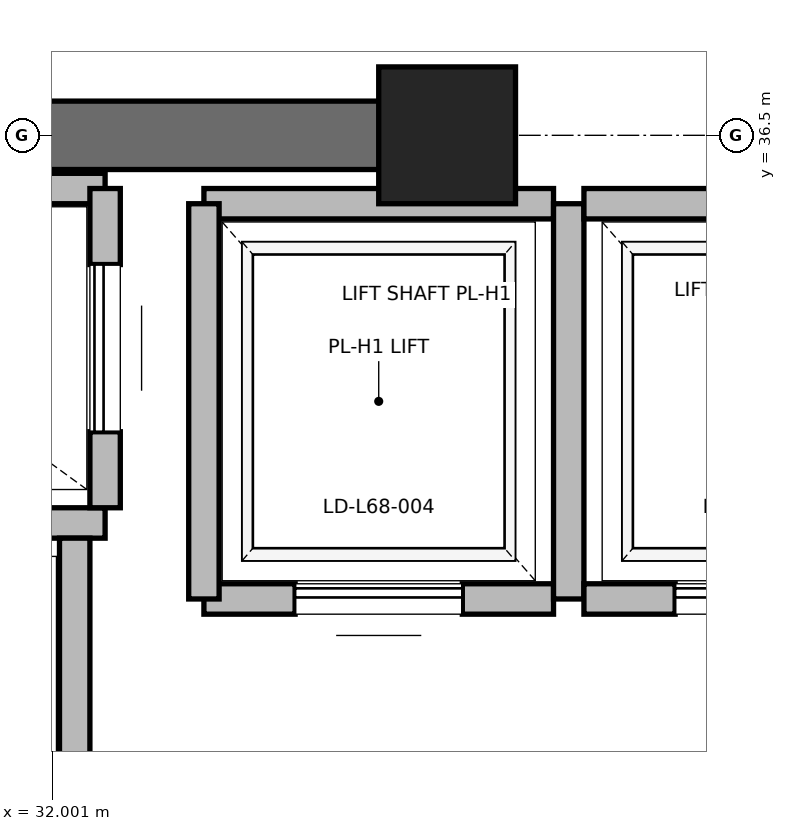
"""IFC4 building model, lengths in metres.
Left out: names, types, materials, properties, quantities, classifications, styles, units other than length and angle.
Written with IfcOpenShell. Run it as: python <this file> out.ifc"""

import sys

from ifc_helpers import new_model, si_unit, direction, frame, frame_2d, origin, origin_2d, place, context, subcontext, project, spatial, rectangle, extrude, element, fill, save


model = new_model("IFC4")
c1 = context("Model", 3, precision=1e-05, world=origin(), true_north=direction((0.0, 1.0)))
c2 = subcontext(c1, "Body", "Model", "MODEL_VIEW")
j1 = project(units=[si_unit("LENGTHUNIT", "METRE"), si_unit("PLANEANGLEUNIT", "RADIAN")], contexts=[c1])
p1 = place(None, origin())
s1 = spatial("IfcSite", under=j1, at=p1, CompositionType="ELEMENT")
p2 = place(p1, origin())
s2 = spatial("IfcBuilding", under=s1, at=p2, CompositionType="ELEMENT")
p3 = place(p2, frame((0.0, 0.0, 291.2)))
s3 = spatial("IfcBuildingStorey", under=s2, at=p3, CompositionType="ELEMENT", Elevation=291.2)
p4 = place(p3, frame((34.6, 36.5, 0.0), z_axis=(0.0, 0.0, 1.0), x_axis=(1.0, 0.0, 0.0)))
e1 = element("IfcColumn", 1, at=p4, inside=s3, PredefinedType="PILASTER", context=c2, shape_type="SweptSolid", body=[
    extrude(rectangle(XDim=0.9, YDim=0.9, at=origin_2d()), origin(), (0.0, 0.0, 1.0), 4.0),
])
p5 = place(p3, frame((29.0, 36.5, 0.0), z_axis=(0.0, 0.0, 1.0), x_axis=(1.0, 0.0, 0.0)))
e2 = element("IfcWall", 2, at=p5, inside=s3, PredefinedType="SHEAR", context=c2, shape_type="SweptSolid", body=[
    extrude(rectangle(XDim=5.8, YDim=0.45, at=frame_2d((2.9, 0.0))), origin(), (0.0, 0.0, 1.0), 3.7),
])
p6 = place(p3, frame((29.55, 33.95, 0.0), z_axis=(0.0, 0.0, 1.0), x_axis=(1.0, 0.0, 0.0)))
e3 = element("IfcWall", 3, at=p6, inside=s3, PredefinedType="SOLIDWALL", context=c2, shape_type="SweptSolid", body=[
    extrude(rectangle(XDim=2.8, YDim=0.2, at=frame_2d((1.4, 0.0))), origin(), (0.0, 0.0, 1.0), 3.7),
])
p7 = place(p3, frame((32.15, 30.85, 0.0), z_axis=(0.0, 0.0, 1.0), x_axis=(0.0, 1.0, 0.0)))
e4 = element("IfcWall", 4, at=p7, inside=s3, PredefinedType="SOLIDWALL", context=c2, shape_type="SweptSolid", body=[
    extrude(rectangle(XDim=3.0, YDim=0.2, at=frame_2d((1.5, 0.0))), origin(), (0.0, 0.0, 1.0), 3.7),
])
p8 = place(p3, frame((32.35, 36.15, 0.0), z_axis=(0.0, 0.0, 1.0), x_axis=(-1.0, 0.0, 0.0)))
e5 = element("IfcWall", 5, at=p8, inside=s3, PredefinedType="SOLIDWALL", context=c2, shape_type="SweptSolid", body=[
    extrude(rectangle(XDim=2.8, YDim=0.2, at=frame_2d((1.4, 0.0))), origin(), (0.0, 0.0, 1.0), 2.753),
])
p9 = place(p3, frame((32.35, 34.05, 0.0), z_axis=(0.0, 0.0, 1.0), x_axis=(0.0, 1.0, 0.0)))
e6 = element("IfcWall", 6, at=p9, inside=s3, PredefinedType="SOLIDWALL", context=c2, shape_type="SweptSolid", body=[
    extrude(rectangle(XDim=2.1, YDim=0.2, at=frame_2d((1.05, 0.0))), origin(), (0.0, 0.0, 1.0), 3.7),
])
p10 = place(p9, frame((0.5, 0.0, 0.0)))
e7 = element("IfcOpeningElement", 7, at=p10, cuts=e6, PredefinedType="OPENING", context=c2, shape_type="SweptSolid", body=[
    extrude(rectangle(XDim=1.1, YDim=2.2, at=frame_2d((0.55, 1.1))), frame((0.0, 0.1, 0.0), z_axis=(0.0, -1.0, 0.0), x_axis=(1.0, 0.0, 0.0)), (0.0, 0.0, 1.0), 0.2),
])
p11 = place(p3, frame((33.0, 33.45, 0.0), z_axis=(0.0, 0.0, 1.0), x_axis=(1.0, 0.0, 0.0)))
e8 = element("IfcWall", 8, at=p11, inside=s3, PredefinedType="SOLIDWALL", context=c2, shape_type="SweptSolid", body=[
    extrude(rectangle(XDim=2.3, YDim=0.2, at=frame_2d((1.15, 0.0))), origin(), (0.0, 0.0, 1.0), 3.7),
])
p12 = place(p11, frame((0.6, 0.0, 0.0)))
e9 = element("IfcOpeningElement", 9, at=p12, cuts=e8, PredefinedType="OPENING", context=c2, shape_type="SweptSolid", body=[
    extrude(rectangle(XDim=1.1, YDim=2.2, at=frame_2d((0.55, 1.1))), frame((0.0, 0.1, 0.0), z_axis=(0.0, -1.0, 0.0), x_axis=(1.0, 0.0, 0.0)), (0.0, 0.0, 1.0), 0.2),
])
p13 = place(p3, frame((35.3, 36.05, 0.0), z_axis=(0.0, 0.0, 1.0), x_axis=(-1.0, 0.0, 0.0)))
e10 = element("IfcWall", 10, at=p13, inside=s3, PredefinedType="SOLIDWALL", context=c2, shape_type="SweptSolid", body=[
    extrude(rectangle(XDim=2.3, YDim=0.2, at=frame_2d((1.15, 0.0))), origin(), (0.0, 0.0, 1.0), 2.78),
])
p14 = place(p3, frame((33.0, 36.05, 0.0), z_axis=(0.0, 0.0, 1.0), x_axis=(0.0, -1.0, 0.0)))
e11 = element("IfcWall", 11, at=p14, inside=s3, PredefinedType="SOLIDWALL", context=c2, shape_type="SweptSolid", body=[
    extrude(rectangle(XDim=2.6, YDim=0.2, at=frame_2d((1.3, 0.0))), origin(), (0.0, 0.0, 1.0), 3.7),
])
p15 = place(p3, frame((35.4, 33.45, 0.0), z_axis=(0.0, 0.0, 1.0), x_axis=(0.0, 1.0, 0.0)))
e12 = element("IfcWall", 12, at=p15, inside=s3, PredefinedType="SOLIDWALL", context=c2, shape_type="SweptSolid", body=[
    extrude(rectangle(XDim=2.6, YDim=0.2, at=frame_2d((1.3, 0.0))), origin(), (0.0, 0.0, 1.0), 2.78),
])
p16 = place(p3, frame((35.5, 33.45, 0.0), z_axis=(0.0, 0.0, 1.0), x_axis=(1.0, 0.0, 0.0)))
e13 = element("IfcWall", 13, at=p16, inside=s3, PredefinedType="SOLIDWALL", context=c2, shape_type="SweptSolid", body=[
    extrude(rectangle(XDim=2.3, YDim=0.2, at=frame_2d((1.15, 0.0))), origin(), (0.0, 0.0, 1.0), 3.7),
])
p17 = place(p16, frame((0.6, 0.0, 0.0)))
e14 = element("IfcOpeningElement", 14, at=p17, cuts=e13, PredefinedType="OPENING", context=c2, shape_type="SweptSolid", body=[
    extrude(rectangle(XDim=1.1, YDim=2.2, at=frame_2d((0.55, 1.1))), frame((0.0, 0.1, 0.0), z_axis=(0.0, -1.0, 0.0), x_axis=(1.0, 0.0, 0.0)), (0.0, 0.0, 1.0), 0.2),
])
p18 = place(p3, frame((37.8, 36.05, 0.0), z_axis=(0.0, 0.0, 1.0), x_axis=(-1.0, 0.0, 0.0)))
e15 = element("IfcWall", 15, at=p18, inside=s3, PredefinedType="SOLIDWALL", context=c2, shape_type="SweptSolid", body=[
    extrude(rectangle(XDim=2.3, YDim=0.2, at=frame_2d((1.15, 0.0))), origin(), (0.0, 0.0, 1.0), 2.78),
])
p19 = place(p10, origin())
e16 = element("IfcDoor", 16, at=p19, inside=s3, OperationType="SLIDING_TO_RIGHT", PredefinedType="DOOR", context=c2, shape_type="SweptSolid", body=[
    extrude(rectangle(XDim=1.1, YDim=2.2, at=frame_2d((0.55, 1.1))), frame((0.0, 0.025, 0.0), z_axis=(0.0, -1.0, 0.0), x_axis=(1.0, 0.0, 0.0)), (0.0, 0.0, 1.0), 0.05),
])
fill(e7, e16)
p20 = place(p12, origin())
e17 = element("IfcDoor", 17, at=p20, inside=s3, OperationType="SLIDING_TO_RIGHT", PredefinedType="DOOR", context=c2, shape_type="SweptSolid", body=[
    extrude(rectangle(XDim=1.1, YDim=2.2, at=frame_2d((0.55, 1.1))), frame((0.0, 0.025, 0.0), z_axis=(0.0, -1.0, 0.0), x_axis=(1.0, 0.0, 0.0)), (0.0, 0.0, 1.0), 0.05),
])
fill(e9, e17)
p21 = place(p17, origin())
e18 = element("IfcDoor", 18, at=p21, inside=s3, OperationType="SLIDING_TO_RIGHT", PredefinedType="DOOR", context=c2, shape_type="SweptSolid", body=[
    extrude(rectangle(XDim=1.1, YDim=2.2, at=frame_2d((0.55, 1.1))), frame((0.0, 0.025, 0.0), z_axis=(0.0, -1.0, 0.0), x_axis=(1.0, 0.0, 0.0)), (0.0, 0.0, 1.0), 0.05),
])
fill(e14, e18)
save(model, sys.argv[1])
